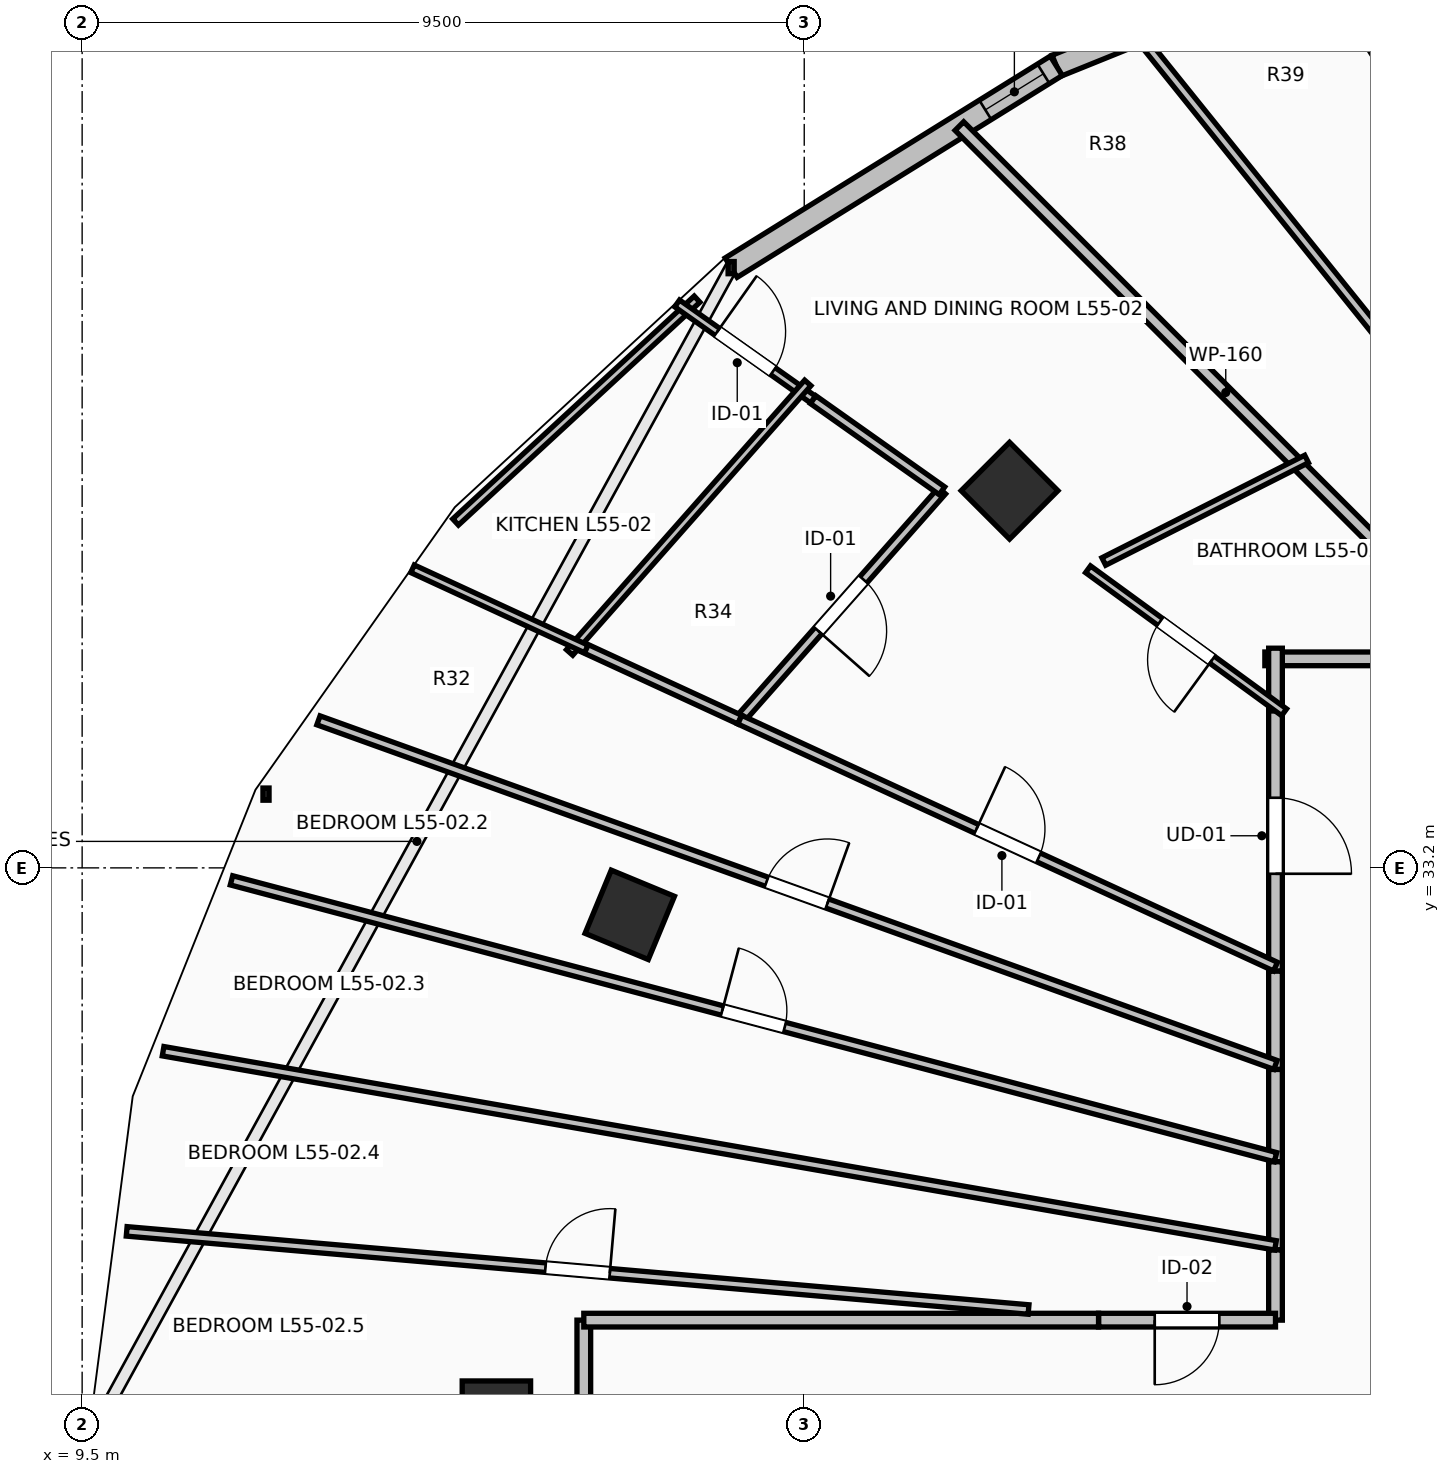
"""IFC4 building model, lengths in metres.
Left out: names, types, materials, properties, quantities, classifications, styles, units other than length and angle.
Written with IfcOpenShell. Run it as: python <this file> out.ifc"""

import sys

from ifc_helpers import new_model, si_unit, direction, frame, frame_2d, origin, origin_2d, place, context, subcontext, project, spatial, rectangle, extrude, element, fill, save


model = new_model("IFC4")
c1 = context("Model", 3, precision=1e-05, world=origin(), true_north=direction((0.0, 1.0)))
c2 = subcontext(c1, "Body", "Model", "MODEL_VIEW")
j1 = project(units=[si_unit("LENGTHUNIT", "METRE"), si_unit("PLANEANGLEUNIT", "RADIAN")], contexts=[c1])
p1 = place(None, origin())
s1 = spatial("IfcSite", under=j1, at=p1, CompositionType="ELEMENT")
p2 = place(p1, origin())
s2 = spatial("IfcBuilding", under=s1, at=p2, CompositionType="ELEMENT")
p3 = place(p2, frame((0.0, 0.0, 203.65)))
s3 = spatial("IfcBuildingStorey", under=s2, at=p3, CompositionType="ELEMENT", Elevation=203.65)
for number, where, z_axis, x_axis in (
    (1, (21.701, 38.162, 0.0), (0.0, 0.0, 1.0), (-0.707, 0.707, 0.0)),
    (2, (16.705, 32.582, 0.0), (0.0, 0.0, 1.0), (-0.924, 0.383, 0.0)),
    (3, (14.95, 26.0, 0.0), (0.0, 0.0, 1.0), (-1.0, 0.0, 0.0)),
):
    element("IfcColumn", number, at=place(p3, frame(where, z_axis=z_axis, x_axis=x_axis)), inside=s3, PredefinedType="COLUMN", context=c2, shape_type="SweptSolid", body=[
        extrude(rectangle(XDim=0.9, YDim=0.9, at=origin_2d()), origin(), (0.0, 0.0, 1.0), 3.55),
    ])
p4 = place(p3, frame((27.197, 45.725, 0.0), z_axis=(0.0, 0.0, 1.0), x_axis=(-0.927111094334, -0.374786630981, 0.0)))
e4 = element("IfcWall", 4, at=p4, inside=s3, PredefinedType="STANDARD", context=c2, shape_type="SweptSolid", body=[
    extrude(rectangle(XDim=5.264, YDim=0.3, at=frame_2d((2.632, 0.0))), origin(), (0.0, 0.0, 1.0), 3.29),
])
p5 = place(p4, frame((0.258, 0.0, 0.85)))
e5 = element("IfcOpeningElement", 5, at=p5, cuts=e4, PredefinedType="OPENING", context=c2, shape_type="SweptSolid", body=[
    extrude(rectangle(XDim=0.9, YDim=1.8, at=frame_2d((0.45, 0.9))), frame((0.0, 0.165, 0.0), z_axis=(0.0, -1.0, 0.0), x_axis=(1.0, 0.0, 0.0)), (0.0, 0.0, 1.0), 0.33),
])
p6 = place(p4, frame((2.032, 0.0, 0.85)))
e6 = element("IfcOpeningElement", 6, at=p6, cuts=e4, PredefinedType="OPENING", context=c2, shape_type="SweptSolid", body=[
    extrude(rectangle(XDim=1.2, YDim=1.95, at=frame_2d((0.6, 0.975))), frame((0.0, 0.165, 0.0), z_axis=(0.0, -1.0, 0.0), x_axis=(1.0, 0.0, 0.0)), (0.0, 0.0, 1.0), 0.33),
])
p7 = place(p3, frame((22.316, 43.752, 0.0), z_axis=(0.0, 0.0, 1.0), x_axis=(-0.849647657754, -0.527350791858, 0.0)))
e7 = element("IfcWall", 7, at=p7, inside=s3, PredefinedType="STANDARD", context=c2, shape_type="SweptSolid", body=[
    extrude(rectangle(XDim=5.035, YDim=0.3, at=frame_2d((2.518, 0.0))), origin(), (0.0, 0.0, 1.0), 3.29),
])
p8 = place(p7, frame((0.199, 0.0, 0.85)))
e8 = element("IfcOpeningElement", 8, at=p8, cuts=e7, PredefinedType="OPENING", context=c2, shape_type="SweptSolid", body=[
    extrude(rectangle(XDim=0.9, YDim=1.8, at=frame_2d((0.45, 0.9))), frame((0.0, 0.165, 0.0), z_axis=(0.0, -1.0, 0.0), x_axis=(1.0, 0.0, 0.0)), (0.0, 0.0, 1.0), 0.33),
])
p9 = place(p3, frame((25.2, 35.404, 0.0), z_axis=(0.0, 0.0, 1.0), x_axis=(0.0, -1.0, 0.0)))
e9 = element("IfcWall", 9, at=p9, inside=s3, PredefinedType="PARTITIONING", context=c2, shape_type="SweptSolid", body=[
    extrude(rectangle(XDim=3.563, YDim=0.18, at=frame_2d((1.781, 0.0))), origin(), (0.0, 0.0, 1.0), 2.482),
])
p10 = place(p9, frame((1.281, 0.0, 0.0)))
e10 = element("IfcOpeningElement", 10, at=p10, cuts=e9, PredefinedType="OPENING", context=c2, shape_type="SweptSolid", body=[
    extrude(rectangle(XDim=1.0, YDim=2.15, at=frame_2d((0.5, 1.075))), frame((0.0, 0.105, 0.0), z_axis=(0.0, -1.0, 0.0), x_axis=(1.0, 0.0, 0.0)), (0.0, 0.0, 1.0), 0.21),
])
p11 = place(p3, frame((28.105, 35.95, 0.0), z_axis=(0.0, 0.0, 1.0), x_axis=(-1.0, 0.0, 0.0)))
e11 = element("IfcWall", 11, at=p11, inside=s3, PredefinedType="PARTITIONING", context=c2, shape_type="SweptSolid", body=[
    extrude(rectangle(XDim=3.045, YDim=0.18, at=frame_2d((1.522, 0.0))), origin(), (0.0, 0.0, 1.0), 2.482),
])
p12 = place(p3, frame((25.2, 36.09, 0.0), z_axis=(0.0, 0.0, 1.0), x_axis=(0.0, -1.0, 0.0)))
e12 = element("IfcWall", 12, at=p12, inside=s3, PredefinedType="PARTITIONING", context=c2, shape_type="SweptSolid", body=[
    extrude(rectangle(XDim=0.826, YDim=0.18, at=frame_2d((0.413, 0.0))), origin(), (0.0, 0.0, 1.0), 2.482),
])
p13 = place(p3, frame((25.2, 31.841, 0.0), z_axis=(0.0, 0.0, 1.0), x_axis=(0.0, -1.0, 0.0)))
e13 = element("IfcWall", 13, at=p13, inside=s3, PredefinedType="PARTITIONING", context=c2, shape_type="SweptSolid", body=[
    extrude(rectangle(XDim=1.293, YDim=0.18, at=frame_2d((0.646, 0.0))), origin(), (0.0, 0.0, 1.0), 3.29),
])
p14 = place(p3, frame((25.2, 30.548, 0.0), z_axis=(0.0, 0.0, 1.0), x_axis=(0.0, -1.0, 0.0)))
e14 = element("IfcWall", 14, at=p14, inside=s3, PredefinedType="PARTITIONING", context=c2, shape_type="SweptSolid", body=[
    extrude(rectangle(XDim=1.214, YDim=0.18, at=frame_2d((0.607, 0.0))), origin(), (0.0, 0.0, 1.0), 2.482),
])
p15 = place(p3, frame((25.2, 29.334, 0.0), z_axis=(0.0, 0.0, 1.0), x_axis=(0.0, -1.0, 0.0)))
e15 = element("IfcWall", 15, at=p15, inside=s3, PredefinedType="PARTITIONING", context=c2, shape_type="SweptSolid", body=[
    extrude(rectangle(XDim=1.16, YDim=0.18, at=frame_2d((0.58, 0.0))), origin(), (0.0, 0.0, 1.0), 2.482),
])
p16 = place(p3, frame((25.2, 28.174, 0.0), z_axis=(0.0, 0.0, 1.0), x_axis=(0.0, -1.0, 0.0)))
e16 = element("IfcWall", 16, at=p16, inside=s3, PredefinedType="PARTITIONING", context=c2, shape_type="SweptSolid", body=[
    extrude(rectangle(XDim=0.924, YDim=0.18, at=frame_2d((0.462, 0.0))), origin(), (0.0, 0.0, 1.0), 2.482),
])
p17 = place(p3, frame((25.2, 27.25, 0.0), z_axis=(0.0, 0.0, 1.0), x_axis=(-1.0, 0.0, 0.0)))
e17 = element("IfcWall", 17, at=p17, inside=s3, PredefinedType="PARTITIONING", context=c2, shape_type="SweptSolid", body=[
    extrude(rectangle(XDim=2.328, YDim=0.18, at=frame_2d((1.164, 0.0))), origin(), (0.0, 0.0, 1.0), 2.482),
])
p18 = place(p17, frame((0.739, 0.0, 0.0)))
e18 = element("IfcOpeningElement", 18, at=p18, cuts=e17, PredefinedType="OPENING", context=c2, shape_type="SweptSolid", body=[
    extrude(rectangle(XDim=0.85, YDim=2.1, at=frame_2d((0.425, 1.05))), frame((0.0, 0.105, 0.0), z_axis=(0.0, -1.0, 0.0), x_axis=(1.0, 0.0, 0.0)), (0.0, 0.0, 1.0), 0.21),
])
p19 = place(p3, frame((16.1, 27.25, 0.0), z_axis=(0.0, 0.0, 1.0), x_axis=(0.0, -1.0, 0.0)))
e19 = element("IfcWall", 19, at=p19, inside=s3, PredefinedType="PARTITIONING", context=c2, shape_type="SweptSolid", body=[
    extrude(rectangle(XDim=1.31, YDim=0.18, at=frame_2d((0.655, 0.0))), origin(), (0.0, 0.0, 1.0), 2.482),
])
p20 = place(p3, frame((22.872, 27.25, 0.0), z_axis=(0.0, 0.0, 1.0), x_axis=(-1.0, 0.0, 0.0)))
e20 = element("IfcWall", 20, at=p20, inside=s3, PredefinedType="PARTITIONING", context=c2, shape_type="SweptSolid", body=[
    extrude(rectangle(XDim=6.772, YDim=0.18, at=frame_2d((3.386, 0.0))), origin(), (0.0, 0.0, 1.0), 2.482),
])
p21 = place(p3, frame((25.749, 45.138, 0.0), z_axis=(0.0, 0.0, 1.0), x_axis=(0.539168632786, -0.842197830335, 0.0)))
e21 = element("IfcWall", 21, at=p21, inside=s3, PredefinedType="PARTITIONING", context=c2, shape_type="SweptSolid", body=[
    extrude(rectangle(XDim=10.909, YDim=0.125, at=frame_2d((5.455, 0.0))), origin(), (0.0, 0.0, 1.0), 2.482),
])
p22 = place(p3, frame((23.378, 44.178, 0.0), z_axis=(0.0, 0.0, 1.0), x_axis=(0.626756813732, -0.779214923137, 0.0)))
e22 = element("IfcWall", 22, at=p22, inside=s3, PredefinedType="PARTITIONING", context=c2, shape_type="SweptSolid", body=[
    extrude(rectangle(XDim=10.559, YDim=0.125, at=frame_2d((5.28, 0.0))), origin(), (0.0, 0.0, 1.0), 2.482),
])
p23 = place(p3, frame((21.041, 42.959, 0.0), z_axis=(0.0, 0.0, 1.0), x_axis=(0.707106781187, -0.707106781187, 0.0)))
e23 = element("IfcWall", 23, at=p23, inside=s3, PredefinedType="PARTITIONING", context=c2, shape_type="SweptSolid", body=[
    extrude(rectangle(XDim=9.912, YDim=0.16, at=frame_2d((4.956, 0.0))), origin(), (0.0, 0.0, 1.0), 2.482),
])
p24 = place(p3, frame((25.313, 35.248, 0.0), z_axis=(0.0, 0.0, 1.0), x_axis=(-0.807968083988, 0.58922625133, 0.0)))
e24 = element("IfcWall", 24, at=p24, inside=s3, PredefinedType="PARTITIONING", context=c2, shape_type="SweptSolid", body=[
    extrude(rectangle(XDim=3.192, YDim=0.11, at=frame_2d((1.596, 0.0))), origin(), (0.0, 0.0, 1.0), 2.482),
])
p25 = place(p24, frame((1.171, 0.0, 0.0)))
e25 = element("IfcOpeningElement", 25, at=p25, cuts=e24, PredefinedType="OPENING", context=c2, shape_type="SweptSolid", body=[
    extrude(rectangle(XDim=0.85, YDim=2.1, at=frame_2d((0.425, 1.05))), frame((0.0, 0.07, 0.0), z_axis=(0.0, -1.0, 0.0), x_axis=(1.0, 0.0, 0.0)), (0.0, 0.0, 1.0), 0.14),
])
p26 = place(p3, frame((22.941, 37.231, 0.0), z_axis=(0.0, 0.0, 1.0), x_axis=(0.892507731149, 0.451032094024, 0.0)))
e26 = element("IfcWall", 26, at=p26, inside=s3, PredefinedType="PARTITIONING", context=c2, shape_type="SweptSolid", body=[
    extrude(rectangle(XDim=2.989, YDim=0.11, at=frame_2d((1.495, 0.0))), origin(), (0.0, 0.0, 1.0), 2.482),
])
p27 = place(p3, frame((17.59, 40.682, 0.0), z_axis=(0.0, 0.0, 1.0), x_axis=(-0.734861902375, -0.678216768031, 0.0)))
e27 = element("IfcWall", 27, at=p27, inside=s3, PredefinedType="PARTITIONING", context=c2, shape_type="SweptSolid", body=[
    extrude(rectangle(XDim=4.323, YDim=0.11, at=frame_2d((2.162, 0.0))), origin(), (0.0, 0.0, 1.0), 3.29),
])
p28 = place(p3, frame((17.328, 40.626, 0.0), z_axis=(0.0, 0.0, 1.0), x_axis=(0.816448938693, -0.577417639588, 0.0)))
e28 = element("IfcWall", 28, at=p28, inside=s3, PredefinedType="PARTITIONING", context=c2, shape_type="SweptSolid", body=[
    extrude(rectangle(XDim=2.192, YDim=0.11, at=frame_2d((1.096, 0.0))), origin(), (0.0, 0.0, 1.0), 3.29),
])
p29 = place(p28, frame((0.646, 0.0, 0.0)))
e29 = element("IfcOpeningElement", 29, at=p29, cuts=e28, PredefinedType="OPENING", context=c2, shape_type="SweptSolid", body=[
    extrude(rectangle(XDim=0.9, YDim=2.1, at=frame_2d((0.45, 1.05))), frame((0.0, 0.07, 0.0), z_axis=(0.0, -1.0, 0.0), x_axis=(1.0, 0.0, 0.0)), (0.0, 0.0, 1.0), 0.14),
])
p30 = place(p3, frame((20.812, 38.161, 0.0), z_axis=(0.0, 0.0, 1.0), x_axis=(-0.662063683649, -0.749447582418, 0.0)))
e30 = element("IfcWall", 30, at=p30, inside=s3, PredefinedType="PARTITIONING", context=c2, shape_type="SweptSolid", body=[
    extrude(rectangle(XDim=4.018, YDim=0.125, at=frame_2d((2.009, 0.0))), origin(), (0.0, 0.0, 1.0), 3.29),
])
p31 = place(p30, frame((1.559, 0.0, 0.0)))
e31 = element("IfcOpeningElement", 31, at=p31, cuts=e30, PredefinedType="OPENING", context=c2, shape_type="SweptSolid", body=[
    extrude(rectangle(XDim=0.9, YDim=2.1, at=frame_2d((0.45, 1.05))), frame((0.0, 0.077, 0.0), z_axis=(0.0, -1.0, 0.0), x_axis=(1.0, 0.0, 0.0)), (0.0, 0.0, 1.0), 0.155),
])
p32 = place(p3, frame((18.152, 35.15, 0.0), z_axis=(0.0, 0.0, 1.0), x_axis=(-0.908192094718, 0.418553603607, 0.0)))
e32 = element("IfcWall", 32, at=p32, inside=s3, PredefinedType="PARTITIONING", context=c2, shape_type="SweptSolid", body=[
    extrude(rectangle(XDim=2.363, YDim=0.125, at=frame_2d((1.182, 0.0))), origin(), (0.0, 0.0, 1.0), 3.29),
])
p33 = place(p3, frame((19.117, 39.36, 0.0), z_axis=(0.0, 0.0, 1.0), x_axis=(0.816315567802, -0.577606175316, 0.0)))
e33 = element("IfcWall", 33, at=p33, inside=s3, PredefinedType="PARTITIONING", context=c2, shape_type="SweptSolid", body=[
    extrude(rectangle(XDim=2.076, YDim=0.125, at=frame_2d((1.038, 0.0))), origin(), (0.0, 0.0, 1.0), 3.29),
])
p34 = place(p3, frame((18.152, 35.15, 0.0), z_axis=(0.0, 0.0, 1.0), x_axis=(0.908152637685, -0.418639208227, 0.0)))
e34 = element("IfcWall", 34, at=p34, inside=s3, PredefinedType="PARTITIONING", context=c2, shape_type="SweptSolid", body=[
    extrude(rectangle(XDim=7.761, YDim=0.125, at=frame_2d((3.88, 0.0))), origin(), (0.0, 0.0, 1.0), 2.824),
])
p35 = place(p34, frame((3.43, 0.0, 0.0)))
e35 = element("IfcOpeningElement", 35, at=p35, cuts=e34, PredefinedType="OPENING", context=c2, shape_type="SweptSolid", body=[
    extrude(rectangle(XDim=0.9, YDim=2.1, at=frame_2d((0.45, 1.05))), frame((0.0, 0.077, 0.0), z_axis=(0.0, -1.0, 0.0), x_axis=(1.0, 0.0, 0.0)), (0.0, 0.0, 1.0), 0.155),
])
p36 = place(p3, frame((15.913, 36.034, 0.0), z_axis=(0.0, 0.0, 1.0), x_axis=(0.662189711464, 0.749336230294, 0.0)))
e36 = element("IfcWall", 36, at=p36, inside=s3, PredefinedType="PARTITIONING", context=c2, shape_type="SweptSolid", body=[
    extrude(rectangle(XDim=4.732, YDim=0.11, at=frame_2d((2.366, 0.0))), origin(), (0.0, 0.0, 1.0), 3.29),
])
p37 = place(p3, frame((13.847, 37.135, 0.0), z_axis=(0.0, 0.0, 1.0), x_axis=(0.908101251341, -0.418750662462, 0.0)))
e37 = element("IfcWall", 37, at=p37, inside=s3, PredefinedType="PARTITIONING", context=c2, shape_type="SweptSolid", body=[
    extrude(rectangle(XDim=2.518, YDim=0.11, at=frame_2d((1.259, 0.0))), origin(), (0.0, 0.0, 1.0), 3.29),
])
p38 = place(p3, frame((12.609, 35.141, 0.0), z_axis=(0.0, 0.0, 1.0), x_axis=(0.940877411069, -0.338747246985, 0.0)))
e38 = element("IfcWall", 38, at=p38, inside=s3, PredefinedType="PARTITIONING", context=c2, shape_type="SweptSolid", body=[
    extrude(rectangle(XDim=13.382, YDim=0.125, at=frame_2d((6.691, 0.0))), origin(), (0.0, 0.0, 1.0), 2.824),
])
p39 = place(p38, frame((6.266, 0.0, 0.0)))
e39 = element("IfcOpeningElement", 39, at=p39, cuts=e38, PredefinedType="OPENING", context=c2, shape_type="SweptSolid", body=[
    extrude(rectangle(XDim=0.85, YDim=2.1, at=frame_2d((0.425, 1.05))), frame((0.0, 0.077, 0.0), z_axis=(0.0, -1.0, 0.0), x_axis=(1.0, 0.0, 0.0)), (0.0, 0.0, 1.0), 0.155),
])
p40 = place(p3, frame((11.465, 33.036, 0.0), z_axis=(0.0, 0.0, 1.0), x_axis=(0.966598137313, -0.256296782934, 0.0)))
e40 = element("IfcWall", 40, at=p40, inside=s3, PredefinedType="PARTITIONING", context=c2, shape_type="SweptSolid", body=[
    extrude(rectangle(XDim=14.209, YDim=0.125, at=frame_2d((7.105, 0.0))), origin(), (0.0, 0.0, 1.0), 2.482),
])
p41 = place(p40, frame((6.68, 0.0, 0.0)))
e41 = element("IfcOpeningElement", 41, at=p41, cuts=e40, PredefinedType="OPENING", context=c2, shape_type="SweptSolid", body=[
    extrude(rectangle(XDim=0.85, YDim=2.1, at=frame_2d((0.425, 1.05))), frame((0.0, 0.077, 0.0), z_axis=(0.0, -1.0, 0.0), x_axis=(1.0, 0.0, 0.0)), (0.0, 0.0, 1.0), 0.155),
])
p42 = place(p3, frame((10.565, 30.788, 0.0), z_axis=(0.0, 0.0, 1.0), x_axis=(0.985109541297, -0.171927867563, 0.0)))
e42 = element("IfcWall", 42, at=p42, inside=s3, PredefinedType="PARTITIONING", context=c2, shape_type="SweptSolid", body=[
    extrude(rectangle(XDim=14.856, YDim=0.125, at=frame_2d((7.428, 0.0))), origin(), (0.0, 0.0, 1.0), 2.824),
])
p43 = place(p3, frame((10.086, 28.418, 0.0), z_axis=(0.0, 0.0, 1.0), x_axis=(0.996267232338, -0.08632266081, 0.0)))
e43 = element("IfcWall", 43, at=p43, inside=s3, PredefinedType="PARTITIONING", context=c2, shape_type="SweptSolid", body=[
    extrude(rectangle(XDim=11.91, YDim=0.125, at=frame_2d((5.955, 0.0))), origin(), (0.0, 0.0, 1.0), 2.482),
])
p44 = place(p43, frame((5.53, 0.0, 0.0)))
e44 = element("IfcOpeningElement", 44, at=p44, cuts=e43, PredefinedType="OPENING", context=c2, shape_type="SweptSolid", body=[
    extrude(rectangle(XDim=0.85, YDim=2.1, at=frame_2d((0.425, 1.05))), frame((0.0, 0.077, 0.0), z_axis=(0.0, -1.0, 0.0), x_axis=(1.0, 0.0, 0.0)), (0.0, 0.0, 1.0), 0.155),
])
p45 = place(p8, origin())
e45 = element("IfcWindow", 45, at=p45, inside=s3, PartitioningType="SINGLE_PANEL", PredefinedType="WINDOW", context=c2, shape_type="SweptSolid", body=[
    extrude(rectangle(XDim=0.9, YDim=1.8, at=frame_2d((0.45, 0.9))), frame((0.0, 0.03, 0.0), z_axis=(0.0, -1.0, 0.0), x_axis=(1.0, 0.0, 0.0)), (0.0, 0.0, 1.0), 0.06),
])
fill(e8, e45)
p46 = place(p10, origin())
e46 = element("IfcDoor", 46, at=p46, inside=s3, OperationType="SINGLE_SWING_RIGHT", PredefinedType="DOOR", context=c2, shape_type="SweptSolid", body=[
    extrude(rectangle(XDim=1.0, YDim=2.15, at=frame_2d((0.5, 1.075))), frame((0.0, 0.025, 0.0), z_axis=(0.0, -1.0, 0.0), x_axis=(1.0, 0.0, 0.0)), (0.0, 0.0, 1.0), 0.05),
])
fill(e10, e46)
p47 = place(p25, origin())
e47 = element("IfcDoor", 47, at=p47, inside=s3, OperationType="SINGLE_SWING_LEFT", PredefinedType="DOOR", context=c2, shape_type="SweptSolid", body=[
    extrude(rectangle(XDim=0.85, YDim=2.1, at=frame_2d((0.425, 1.05))), frame((0.0, 0.025, 0.0), z_axis=(0.0, -1.0, 0.0), x_axis=(1.0, 0.0, 0.0)), (0.0, 0.0, 1.0), 0.05),
])
fill(e25, e47)
p48 = place(p29, origin())
e48 = element("IfcDoor", 48, at=p48, inside=s3, OperationType="SINGLE_SWING_LEFT", PredefinedType="DOOR", context=c2, shape_type="SweptSolid", body=[
    extrude(rectangle(XDim=0.9, YDim=2.1, at=frame_2d((0.45, 1.05))), frame((0.0, 0.025, 0.0), z_axis=(0.0, -1.0, 0.0), x_axis=(1.0, 0.0, 0.0)), (0.0, 0.0, 1.0), 0.05),
])
fill(e29, e48)
p49 = place(p31, origin())
e49 = element("IfcDoor", 49, at=p49, inside=s3, OperationType="SINGLE_SWING_RIGHT", PredefinedType="DOOR", context=c2, shape_type="SweptSolid", body=[
    extrude(rectangle(XDim=0.9, YDim=2.1, at=frame_2d((0.45, 1.05))), frame((0.0, 0.025, 0.0), z_axis=(0.0, -1.0, 0.0), x_axis=(1.0, 0.0, 0.0)), (0.0, 0.0, 1.0), 0.05),
])
fill(e31, e49)
p50 = place(p35, origin())
e50 = element("IfcDoor", 50, at=p50, inside=s3, OperationType="SINGLE_SWING_LEFT", PredefinedType="DOOR", context=c2, shape_type="SweptSolid", body=[
    extrude(rectangle(XDim=0.9, YDim=2.1, at=frame_2d((0.45, 1.05))), frame((0.0, 0.025, 0.0), z_axis=(0.0, -1.0, 0.0), x_axis=(1.0, 0.0, 0.0)), (0.0, 0.0, 1.0), 0.05),
])
fill(e35, e50)
p51 = place(p18, origin())
e51 = element("IfcDoor", 51, at=p51, inside=s3, OperationType="SINGLE_SWING_RIGHT", PredefinedType="DOOR", context=c2, shape_type="SweptSolid", body=[
    extrude(rectangle(XDim=0.85, YDim=2.1, at=frame_2d((0.425, 1.05))), frame((0.0, 0.025, 0.0), z_axis=(0.0, -1.0, 0.0), x_axis=(1.0, 0.0, 0.0)), (0.0, 0.0, 1.0), 0.05),
])
fill(e18, e51)
p52 = place(p39, origin())
e52 = element("IfcDoor", 52, at=p52, inside=s3, OperationType="SINGLE_SWING_RIGHT", PredefinedType="DOOR", context=c2, shape_type="SweptSolid", body=[
    extrude(rectangle(XDim=0.85, YDim=2.1, at=frame_2d((0.425, 1.05))), frame((0.0, 0.025, 0.0), z_axis=(0.0, -1.0, 0.0), x_axis=(1.0, 0.0, 0.0)), (0.0, 0.0, 1.0), 0.05),
])
fill(e39, e52)
p53 = place(p41, origin())
e53 = element("IfcDoor", 53, at=p53, inside=s3, OperationType="SINGLE_SWING_LEFT", PredefinedType="DOOR", context=c2, shape_type="SweptSolid", body=[
    extrude(rectangle(XDim=0.85, YDim=2.1, at=frame_2d((0.425, 1.05))), frame((0.0, 0.025, 0.0), z_axis=(0.0, -1.0, 0.0), x_axis=(1.0, 0.0, 0.0)), (0.0, 0.0, 1.0), 0.05),
])
fill(e41, e53)
p54 = place(p44, origin())
e54 = element("IfcDoor", 54, at=p54, inside=s3, OperationType="SINGLE_SWING_RIGHT", PredefinedType="DOOR", context=c2, shape_type="SweptSolid", body=[
    extrude(rectangle(XDim=0.85, YDim=2.1, at=frame_2d((0.425, 1.05))), frame((0.0, 0.025, 0.0), z_axis=(0.0, -1.0, 0.0), x_axis=(1.0, 0.0, 0.0)), (0.0, 0.0, 1.0), 0.05),
])
fill(e44, e54)
save(model, sys.argv[1])
